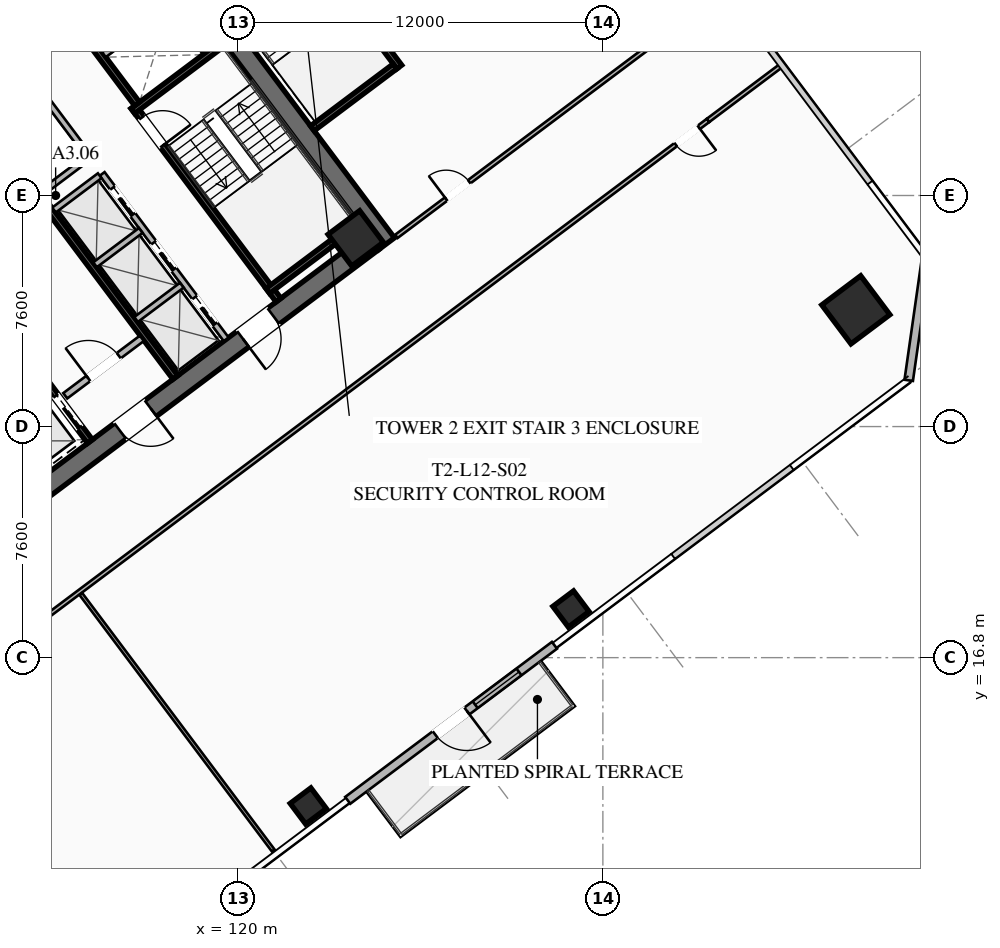
"""IFC4 building model, lengths in metres.
Left out: names, types, materials, properties, quantities, classifications, styles, units other than length and angle.
Written with IfcOpenShell. Run it as: python <this file> out.ifc"""

import sys

from ifc_helpers import new_model, si_unit, direction, frame, frame_2d, origin, origin_2d, place, context, subcontext, project, spatial, rectangle, hollow_rectangle, extrude, element, fill, save


model = new_model("IFC4")
c1 = context("Model", 3, precision=1e-05, world=origin(), true_north=direction((0.0, 1.0)))
c2 = subcontext(c1, "Body", "Model", "MODEL_VIEW")
j1 = project(units=[si_unit("LENGTHUNIT", "METRE"), si_unit("PLANEANGLEUNIT", "RADIAN")], contexts=[c1])
p1 = place(None, origin())
s1 = spatial("IfcSite", under=j1, at=p1, CompositionType="ELEMENT")
p2 = place(p1, origin())
s2 = spatial("IfcBuilding", under=s1, at=p2, CompositionType="ELEMENT")
p3 = place(p2, frame((0.0, 0.0, 49.45)))
s3 = spatial("IfcBuildingStorey", under=s2, at=p3, CompositionType="ELEMENT", Elevation=49.45)
p4 = place(p3, frame((115.524, 42.893, 0.0), z_axis=(0.0, 0.0, 1.0), x_axis=(0.600005007985, -0.799996243986, 0.0)))
e1 = element("IfcWall", 1, at=p4, inside=s3, PredefinedType="SHEAR", context=c2, shape_type="SweptSolid", body=[
    extrude(rectangle(XDim=15.6, YDim=0.65, at=frame_2d((7.8, 0.0))), origin(), (0.0, 0.0, 1.0), 3.55),
])
p5 = place(p3, frame((124.429, 30.478, 0.0), z_axis=(0.0, 0.0, 1.0), x_axis=(-0.799998028465, -0.600002628705, 0.0)))
e2 = element("IfcWall", 2, at=p5, inside=s3, PredefinedType="SHEAR", context=c2, shape_type="SweptSolid", body=[
    extrude(rectangle(XDim=14.86, YDim=0.65, at=frame_2d((7.43, 0.0))), origin(), (0.0, 0.0, 1.0), 3.55),
])
p6 = place(p5, frame((9.13, 0.0, 0.0)))
e3 = element("IfcOpeningElement", 3, at=p6, cuts=e2, PredefinedType="OPENING", context=c2, shape_type="SweptSolid", body=[
    extrude(rectangle(XDim=1.25, YDim=2.25, at=frame_2d((0.625, 1.125))), frame((0.0, 0.335, 0.0), z_axis=(0.0, -1.0, 0.0), x_axis=(1.0, 0.0, 0.0)), (0.0, 0.0, 1.0), 0.67),
])
p7 = place(p5, frame((4.08, 0.0, 0.0)))
e4 = element("IfcOpeningElement", 4, at=p7, cuts=e2, PredefinedType="OPENING", context=c2, shape_type="SweptSolid", body=[
    extrude(rectangle(XDim=1.25, YDim=2.25, at=frame_2d((0.625, 1.125))), frame((0.0, 0.335, 0.0), z_axis=(0.0, -1.0, 0.0), x_axis=(1.0, 0.0, 0.0)), (0.0, 0.0, 1.0), 0.67),
])
p8 = place(p3, frame((103.571, 33.522, 0.0), z_axis=(0.0, 0.0, 1.0), x_axis=(0.799998028465, 0.600002628705, 0.0)))
e5 = element("IfcWall", 5, at=p8, inside=s3, PredefinedType="SHEAR", context=c2, shape_type="SweptSolid", body=[
    extrude(rectangle(XDim=14.86, YDim=0.65, at=frame_2d((7.43, 0.0))), origin(), (0.0, 0.0, 1.0), 3.55),
])
p9 = place(p8, frame((4.48, 0.0, 0.0)))
e6 = element("IfcOpeningElement", 6, at=p9, cuts=e5, PredefinedType="OPENING", context=c2, shape_type="SweptSolid", body=[
    extrude(rectangle(XDim=1.25, YDim=2.25, at=frame_2d((0.625, 1.125))), frame((0.0, 0.335, 0.0), z_axis=(0.0, -1.0, 0.0), x_axis=(1.0, 0.0, 0.0)), (0.0, 0.0, 1.0), 0.67),
])
p10 = place(p8, frame((9.53, 0.0, 0.0)))
e7 = element("IfcOpeningElement", 7, at=p10, cuts=e5, PredefinedType="OPENING", context=c2, shape_type="SweptSolid", body=[
    extrude(rectangle(XDim=1.25, YDim=2.25, at=frame_2d((0.625, 1.125))), frame((0.0, 0.335, 0.0), z_axis=(0.0, -1.0, 0.0), x_axis=(1.0, 0.0, 0.0)), (0.0, 0.0, 1.0), 0.67),
])
p11 = place(p3, frame((123.87, 30.59, 0.0), z_axis=(0.0, 0.0, 1.0), x_axis=(0.799999996291, 0.600000004945, 0.0)))
e8 = element("IfcColumn", 8, at=p11, inside=s3, PredefinedType="COLUMN", context=c2, shape_type="SweptSolid", body=[
    extrude(hollow_rectangle(XDim=1.3, YDim=1.3, WallThickness=0.05, at=origin_2d()), origin(), (0.0, 0.0, 1.0), 3.35),
])
p12 = place(p3, frame((140.32, 28.24, 0.0), z_axis=(0.0, 0.0, 1.0), x_axis=(0.799999996291, 0.600000004945, 0.0)))
e9 = element("IfcColumn", 9, at=p12, inside=s3, PredefinedType="COLUMN", context=c2, shape_type="SweptSolid", body=[
    extrude(hollow_rectangle(XDim=1.6, YDim=1.6, WallThickness=0.06, at=origin_2d()), origin(), (0.0, 0.0, 1.0), 3.35),
])
for number, where, z_axis, x_axis in (
    (10, (122.31, 11.92, 0.0), (0.0, 0.0, 1.0), (0.8, 0.6, 0.0)),
    (11, (130.95, 18.4, 0.0), (0.0, 0.0, 1.0), (0.8, 0.6, 0.0)),
):
    element("IfcColumn", number, at=place(p3, frame(where, z_axis=z_axis, x_axis=x_axis)), inside=s3, PredefinedType="COLUMN", context=c2, shape_type="SweptSolid", body=[
        extrude(hollow_rectangle(XDim=0.85, YDim=0.85, WallThickness=0.035, at=origin_2d()), origin(), (0.0, 0.0, 1.0), 3.35),
    ])
p13 = place(p3, frame((130.408, 17.206, 0.0), z_axis=(0.0, 0.0, 1.0), x_axis=(-0.799996553335, -0.600004595526, 0.0)))
e12 = element("IfcWall", 12, at=p13, inside=s3, PredefinedType="SOLIDWALL", context=c2, shape_type="SweptSolid", body=[
    extrude(rectangle(XDim=8.5, YDim=0.28, at=frame_2d((4.25, 0.0))), origin(), (0.0, 0.0, 1.0), 3.35),
])
p14 = place(p13, frame((3.6, 0.0, 0.0)))
e13 = element("IfcOpeningElement", 13, at=p14, cuts=e12, PredefinedType="OPENING", context=c2, shape_type="SweptSolid", body=[
    extrude(rectangle(XDim=1.3, YDim=2.15, at=frame_2d((0.65, 1.075))), frame((0.0, 0.15, 0.0), z_axis=(0.0, -1.0, 0.0), x_axis=(1.0, 0.0, 0.0)), (0.0, 0.0, 1.0), 0.3),
])
p15 = place(p13, frame((1.46, 0.0, 0.85)))
e14 = element("IfcOpeningElement", 14, at=p15, cuts=e12, PredefinedType="OPENING", context=c2, shape_type="SweptSolid", body=[
    extrude(rectangle(XDim=1.8, YDim=1.92, at=frame_2d((0.9, 0.96))), frame((0.0, 0.15, 0.0), z_axis=(0.0, -1.0, 0.0), x_axis=(1.0, 0.0, 0.0)), (0.0, 0.0, 1.0), 0.3),
])
p16 = place(p3, frame((142.64, 29.98, 0.0), z_axis=(0.0, 0.0, 1.0), x_axis=(-0.14137968631, -0.989955445613, 0.0)))
e15 = element("IfcWall", 15, at=p16, inside=s3, PredefinedType="SOLIDWALL", context=c2, shape_type="SweptSolid", body=[
    extrude(rectangle(XDim=4.101, YDim=0.28, at=frame_2d((2.051, 0.0))), origin(), (0.0, 0.0, 1.0), 3.35),
])
p17 = place(p3, frame((116.56, 34.92, 0.0), z_axis=(0.0, 0.0, 1.0), x_axis=(0.600009827119, -0.799992629566, 0.0)))
e16 = element("IfcWall", 16, at=p17, inside=s3, PredefinedType="SHEAR", context=c2, shape_type="SweptSolid", body=[
    extrude(rectangle(XDim=7.95, YDim=0.2, at=frame_2d((3.975, 0.0))), origin(), (0.0, 0.0, 1.0), 3.35),
])
p18 = place(p17, frame((0.45, 0.0, 0.0)))
e17 = element("IfcOpeningElement", 17, at=p18, cuts=e16, PredefinedType="OPENING", context=c2, shape_type="SweptSolid", body=[
    extrude(rectangle(XDim=1.15, YDim=2.2, at=frame_2d((0.575, 1.1))), frame((0.0, 0.11, 0.0), z_axis=(0.0, -1.0, 0.0), x_axis=(1.0, 0.0, 0.0)), (0.0, 0.0, 1.0), 0.22),
])
for number, where, z_axis, x_axis in (
    (18, (116.54, 34.78, 0.0), (0.0, 0.0, 1.0), (0.8, 0.6, 0.0)),
    (19, (120.98, 28.86, 0.0), (0.0, 0.0, 1.0), (0.8, 0.6, 0.0)),
):
    element("IfcWall", number, at=place(p3, frame(where, z_axis=z_axis, x_axis=x_axis)), inside=s3, PredefinedType="SHEAR", context=c2, shape_type="SweptSolid", body=[
        extrude(rectangle(XDim=3.73, YDim=0.2, at=frame_2d((1.865, 0.0))), origin(), (0.0, 0.0, 1.0), 3.35),
    ])
p19 = place(p3, frame((117.938, 26.016, 0.0), z_axis=(0.0, 0.0, 1.0), x_axis=(-0.600005463273, 0.799995902516, 0.0)))
e20 = element("IfcWall", 20, at=p19, inside=s3, PredefinedType="SHEAR", context=c2, shape_type="SweptSolid", body=[
    extrude(rectangle(XDim=14.3, YDim=0.2, at=frame_2d((7.15, 0.0))), origin(), (0.0, 0.0, 1.0), 3.35),
])
p20 = place(p3, frame((114.316, 25.412, 0.0), z_axis=(0.0, 0.0, 1.0), x_axis=(0.800018601094, 0.59997519774, 0.0)))
e21 = element("IfcWall", 21, at=p20, inside=s3, PredefinedType="SOLIDWALL", context=c2, shape_type="SweptSolid", body=[
    extrude(rectangle(XDim=3.15, YDim=0.22, at=frame_2d((1.575, 0.0))), origin(), (0.0, 0.0, 1.0), 2.703),
])
p21 = place(p20, frame((0.95, 0.0, 0.0)))
e22 = element("IfcOpeningElement", 22, at=p21, cuts=e21, PredefinedType="OPENING", context=c2, shape_type="SweptSolid", body=[
    extrude(rectangle(XDim=1.25, YDim=2.25, at=frame_2d((0.625, 1.125))), frame((0.0, 0.12, 0.0), z_axis=(0.0, -1.0, 0.0), x_axis=(1.0, 0.0, 0.0)), (0.0, 0.0, 1.0), 0.24),
])
p22 = place(p3, frame((115.13, 23.91, 0.0), z_axis=(0.0, 0.0, 1.0), x_axis=(-0.599975393228, 0.800018454488, 0.0)))
e23 = element("IfcWall", 23, at=p22, inside=s3, PredefinedType="SHEAR", context=c2, shape_type="SweptSolid", body=[
    extrude(rectangle(XDim=6.35, YDim=0.2, at=frame_2d((3.175, 0.0))), origin(), (0.0, 0.0, 1.0), 3.35),
])
p23 = place(p22, frame((4.775, 0.0, 0.0)))
e24 = element("IfcOpeningElement", 24, at=p23, cuts=e23, PredefinedType="OPENING", context=c2, shape_type="SweptSolid", body=[
    extrude(rectangle(XDim=1.3, YDim=2.25, at=frame_2d((0.65, 1.125))), frame((0.0, 0.11, 0.0), z_axis=(0.0, -1.0, 0.0), x_axis=(1.0, 0.0, 0.0)), (0.0, 0.0, 1.0), 0.22),
])
p24 = place(p22, frame((2.775, 0.0, 0.0)))
e25 = element("IfcOpeningElement", 25, at=p24, cuts=e23, PredefinedType="OPENING", context=c2, shape_type="SweptSolid", body=[
    extrude(rectangle(XDim=1.3, YDim=2.25, at=frame_2d((0.65, 1.125))), frame((0.0, 0.11, 0.0), z_axis=(0.0, -1.0, 0.0), x_axis=(1.0, 0.0, 0.0)), (0.0, 0.0, 1.0), 0.22),
])
p25 = place(p22, frame((0.575, 0.0, 0.0)))
e26 = element("IfcOpeningElement", 26, at=p25, cuts=e23, PredefinedType="OPENING", context=c2, shape_type="SweptSolid", body=[
    extrude(rectangle(XDim=1.3, YDim=2.25, at=frame_2d((0.65, 1.125))), frame((0.0, 0.11, 0.0), z_axis=(0.0, -1.0, 0.0), x_axis=(1.0, 0.0, 0.0)), (0.0, 0.0, 1.0), 0.22),
])
p26 = place(p3, frame((112.87, 40.09, 0.0), z_axis=(0.0, 0.0, 1.0), x_axis=(0.599975393228, -0.800018454488, 0.0)))
e27 = element("IfcWall", 27, at=p26, inside=s3, PredefinedType="SHEAR", context=c2, shape_type="SweptSolid", body=[
    extrude(rectangle(XDim=6.35, YDim=0.2, at=frame_2d((3.175, 0.0))), origin(), (0.0, 0.0, 1.0), 3.35),
])
p27 = place(p3, frame((115.59, 36.63, 0.0), z_axis=(0.0, 0.0, 1.0), x_axis=(0.799973995579, 0.600034670996, 0.0)))
e28 = element("IfcWall", 28, at=p27, inside=s3, PredefinedType="SOLIDWALL", context=c2, shape_type="SweptSolid", body=[
    extrude(rectangle(XDim=3.38, YDim=0.2, at=frame_2d((1.69, 0.0))), origin(), (0.0, 0.0, 1.0), 3.35),
])
p28 = place(p3, frame((119.61, 27.27, 0.0), z_axis=(0.0, 0.0, 1.0), x_axis=(-0.600011488909, 0.79999138319, 0.0)))
e29 = element("IfcWall", 29, at=p28, inside=s3, PredefinedType="SOLIDWALL", context=c2, shape_type="SweptSolid", body=[
    extrude(rectangle(XDim=6.8, YDim=0.2, at=frame_2d((3.4, 0.0))), origin(), (0.0, 0.0, 1.0), 3.35),
])
p29 = place(p28, frame((0.625, 0.0, 0.0)))
e30 = element("IfcOpeningElement", 30, at=p29, cuts=e29, PredefinedType="OPENING", context=c2, shape_type="SweptSolid", body=[
    extrude(rectangle(XDim=1.1, YDim=2.2, at=frame_2d((0.55, 1.1))), frame((0.0, 0.11, 0.0), z_axis=(0.0, -1.0, 0.0), x_axis=(1.0, 0.0, 0.0)), (0.0, 0.0, 1.0), 0.22),
])
p30 = place(p28, frame((2.875, 0.0, 0.0)))
e31 = element("IfcOpeningElement", 31, at=p30, cuts=e29, PredefinedType="OPENING", context=c2, shape_type="SweptSolid", body=[
    extrude(rectangle(XDim=1.1, YDim=2.2, at=frame_2d((0.55, 1.1))), frame((0.0, 0.11, 0.0), z_axis=(0.0, -1.0, 0.0), x_axis=(1.0, 0.0, 0.0)), (0.0, 0.0, 1.0), 0.22),
])
p31 = place(p28, frame((5.125, 0.0, 0.0)))
e32 = element("IfcOpeningElement", 32, at=p31, cuts=e29, PredefinedType="OPENING", context=c2, shape_type="SweptSolid", body=[
    extrude(rectangle(XDim=1.1, YDim=2.2, at=frame_2d((0.55, 1.1))), frame((0.0, 0.11, 0.0), z_axis=(0.0, -1.0, 0.0), x_axis=(1.0, 0.0, 0.0)), (0.0, 0.0, 1.0), 0.22),
])
p32 = place(p3, frame((116.646, 27.922, 0.0), z_axis=(0.0, 0.0, 1.0), x_axis=(0.8, 0.6, 0.0)))
e33 = element("IfcWall", 33, at=p32, inside=s3, PredefinedType="SOLIDWALL", context=c2, shape_type="SweptSolid", body=[
    extrude(rectangle(XDim=1.88, YDim=0.2, at=frame_2d((0.94, 0.0))), origin(), (0.0, 0.0, 1.0), 3.35),
])
p33 = place(p3, frame((115.296, 29.722, 0.0), z_axis=(0.0, 0.0, 1.0), x_axis=(0.799984418148, 0.600020775241, 0.0)))
e34 = element("IfcWall", 34, at=p33, inside=s3, PredefinedType="SOLIDWALL", context=c2, shape_type="SweptSolid", body=[
    extrude(rectangle(XDim=1.88, YDim=0.2, at=frame_2d((0.94, 0.0))), origin(), (0.0, 0.0, 1.0), 3.35),
])
p34 = place(p3, frame((113.946, 31.522, 0.0), z_axis=(0.0, 0.0, 1.0), x_axis=(0.8, 0.6, 0.0)))
e35 = element("IfcWall", 35, at=p34, inside=s3, PredefinedType="SOLIDWALL", context=c2, shape_type="SweptSolid", body=[
    extrude(rectangle(XDim=1.88, YDim=0.2, at=frame_2d((0.94, 0.0))), origin(), (0.0, 0.0, 1.0), 3.35),
])
p35 = place(p3, frame((115.11, 33.27, 0.0), z_axis=(0.0, 0.0, 1.0), x_axis=(-0.600011488909, 0.79999138319, 0.0)))
e36 = element("IfcWall", 36, at=p35, inside=s3, PredefinedType="SOLIDWALL", context=c2, shape_type="SweptSolid", body=[
    extrude(rectangle(XDim=6.8, YDim=0.2, at=frame_2d((3.4, 0.0))), origin(), (0.0, 0.0, 1.0), 3.35),
])
p36 = place(p3, frame((113.526, 32.082, 0.0), z_axis=(0.0, 0.0, 1.0), x_axis=(0.800046745961, 0.599937666993, 0.0)))
e37 = element("IfcWall", 37, at=p36, inside=s3, PredefinedType="SOLIDWALL", context=c2, shape_type="SweptSolid", body=[
    extrude(rectangle(XDim=1.88, YDim=0.2, at=frame_2d((0.94, 0.0))), origin(), (0.0, 0.0, 1.0), 3.35),
])
p37 = place(p3, frame((125.304, 36.228, 0.0), z_axis=(0.0, 0.0, 1.0), x_axis=(-0.59998851072, 0.800008616831, 0.0)))
e38 = element("IfcWall", 38, at=p37, inside=s3, PredefinedType="SHEAR", context=c2, shape_type="SweptSolid", body=[
    extrude(rectangle(XDim=6.8, YDim=0.2, at=frame_2d((3.4, 0.0))), origin(), (0.0, 0.0, 1.0), 3.35),
])
p38 = place(p3, frame((122.444, 34.208, 0.0), z_axis=(0.0, 0.0, 1.0), x_axis=(0.79999138319, 0.600011488909, 0.0)))
e39 = element("IfcWall", 39, at=p38, inside=s3, PredefinedType="SHEAR", context=c2, shape_type="SweptSolid", body=[
    extrude(rectangle(XDim=3.4, YDim=0.2, at=frame_2d((1.7, 0.0))), origin(), (0.0, 0.0, 1.0), 3.35),
])
p39 = place(p3, frame((98.516, 34.012, 0.0), z_axis=(0.0, 0.0, 1.0), x_axis=(0.799998035726, 0.600002619023, 0.0)))
e40 = element("IfcWall", 40, at=p39, inside=s3, PredefinedType="PARTITIONING", context=c2, shape_type="SweptSolid", body=[
    extrude(rectangle(XDim=29.83, YDim=0.135, at=frame_2d((14.915, 0.0))), origin(), (0.0, 0.0, 1.0), 2.703),
])
p40 = place(p39, frame((0.3, 0.0, 0.0)))
e41 = element("IfcOpeningElement", 41, at=p40, cuts=e40, PredefinedType="OPENING", context=c2, shape_type="SweptSolid", body=[
    extrude(rectangle(XDim=0.95, YDim=2.05, at=frame_2d((0.475, 1.025))), frame((0.0, 0.077, 0.0), z_axis=(0.0, -1.0, 0.0), x_axis=(1.0, 0.0, 0.0)), (0.0, 0.0, 1.0), 0.155),
])
p41 = place(p39, frame((28.58, 0.0, 0.0)))
e42 = element("IfcOpeningElement", 42, at=p41, cuts=e40, PredefinedType="OPENING", context=c2, shape_type="SweptSolid", body=[
    extrude(rectangle(XDim=0.95, YDim=2.05, at=frame_2d((0.475, 1.025))), frame((0.0, 0.077, 0.0), z_axis=(0.0, -1.0, 0.0), x_axis=(1.0, 0.0, 0.0)), (0.0, 0.0, 1.0), 0.155),
])
p42 = place(p3, frame((135.46, 34.47, 0.0), z_axis=(0.0, 0.0, 1.0), x_axis=(-0.800000982127, -0.599998690494, 0.0)))
e43 = element("IfcWall", 43, at=p42, inside=s3, PredefinedType="PARTITIONING", context=c2, shape_type="SweptSolid", body=[
    extrude(rectangle(XDim=29.83, YDim=0.135, at=frame_2d((14.915, 0.0))), origin(), (0.0, 0.0, 1.0), 2.703),
])
p43 = place(p42, frame((28.5, 0.0, 0.0)))
e44 = element("IfcOpeningElement", 44, at=p43, cuts=e43, PredefinedType="OPENING", context=c2, shape_type="SweptSolid", body=[
    extrude(rectangle(XDim=0.95, YDim=2.05, at=frame_2d((0.475, 1.025))), frame((0.0, 0.077, 0.0), z_axis=(0.0, -1.0, 0.0), x_axis=(1.0, 0.0, 0.0)), (0.0, 0.0, 1.0), 0.155),
])
p44 = place(p42, frame((0.38, 0.0, 0.0)))
e45 = element("IfcOpeningElement", 45, at=p44, cuts=e43, PredefinedType="OPENING", context=c2, shape_type="SweptSolid", body=[
    extrude(rectangle(XDim=0.95, YDim=2.05, at=frame_2d((0.475, 1.025))), frame((0.0, 0.077, 0.0), z_axis=(0.0, -1.0, 0.0), x_axis=(1.0, 0.0, 0.0)), (0.0, 0.0, 1.0), 0.155),
])
p45 = place(p3, frame((135.46, 34.47, 0.0), z_axis=(0.0, 0.0, 1.0), x_axis=(0.799990331366, 0.600012891296, 0.0)))
e46 = element("IfcWall", 46, at=p45, inside=s3, PredefinedType="PARTITIONING", context=c2, shape_type="SweptSolid", body=[
    extrude(rectangle(XDim=3.03, YDim=0.135, at=frame_2d((1.515, 0.0))), origin(), (0.0, 0.0, 1.0), 2.703),
])
p46 = place(p3, frame((121.158, 10.456, 0.0), z_axis=(0.0, 0.0, 1.0), x_axis=(-0.600007405188, 0.799994446056, 0.0)))
e47 = element("IfcWall", 47, at=p46, inside=s3, PredefinedType="PARTITIONING", context=c2, shape_type="SweptSolid", body=[
    extrude(rectangle(XDim=10.55, YDim=0.11, at=frame_2d((5.275, 0.0))), origin(), (0.0, 0.0, 1.0), 2.703),
])
p47 = place(p3, frame((125.208, 30.656, 0.0), z_axis=(0.0, 0.0, 1.0), x_axis=(0.799995666112, 0.600005778473, 0.0)))
e48 = element("IfcWall", 48, at=p47, inside=s3, PredefinedType="PARTITIONING", context=c2, shape_type="SweptSolid", body=[
    extrude(rectangle(XDim=13.52, YDim=0.135, at=frame_2d((6.76, 0.0))), origin(), (0.0, 0.0, 1.0), 2.703),
])
p48 = place(p47, frame((2.045, 0.0, 0.0)))
e49 = element("IfcOpeningElement", 49, at=p48, cuts=e48, PredefinedType="OPENING", context=c2, shape_type="SweptSolid", body=[
    extrude(rectangle(XDim=0.95, YDim=2.05, at=frame_2d((0.475, 1.025))), frame((0.0, 0.077, 0.0), z_axis=(0.0, -1.0, 0.0), x_axis=(1.0, 0.0, 0.0)), (0.0, 0.0, 1.0), 0.155),
])
p49 = place(p14, origin())
e50 = element("IfcDoor", 50, at=p49, inside=s3, OperationType="SINGLE_SWING_LEFT", PredefinedType="DOOR", context=c2, shape_type="SweptSolid", body=[
    extrude(rectangle(XDim=1.3, YDim=2.15, at=frame_2d((0.65, 1.075))), frame((0.0, 0.025, 0.0), z_axis=(0.0, -1.0, 0.0), x_axis=(1.0, 0.0, 0.0)), (0.0, 0.0, 1.0), 0.05),
])
fill(e13, e50)
p50 = place(p15, origin())
e51 = element("IfcWindow", 51, at=p50, inside=s3, PartitioningType="SINGLE_PANEL", PredefinedType="WINDOW", context=c2, shape_type="SweptSolid", body=[
    extrude(rectangle(XDim=1.8, YDim=1.92, at=frame_2d((0.9, 0.96))), frame((0.0, 0.03, 0.0), z_axis=(0.0, -1.0, 0.0), x_axis=(1.0, 0.0, 0.0)), (0.0, 0.0, 1.0), 0.06),
])
fill(e14, e51)
p51 = place(p6, origin())
e52 = element("IfcDoor", 52, at=p51, inside=s3, OperationType="SINGLE_SWING_LEFT", PredefinedType="DOOR", context=c2, shape_type="SweptSolid", body=[
    extrude(rectangle(XDim=1.25, YDim=2.25, at=frame_2d((0.625, 1.125))), frame((0.0, 0.025, 0.0), z_axis=(0.0, -1.0, 0.0), x_axis=(1.0, 0.0, 0.0)), (0.0, 0.0, 1.0), 0.05),
])
fill(e3, e52)
p52 = place(p7, origin())
e53 = element("IfcDoor", 53, at=p52, inside=s3, OperationType="SINGLE_SWING_RIGHT", PredefinedType="DOOR", context=c2, shape_type="SweptSolid", body=[
    extrude(rectangle(XDim=1.25, YDim=2.25, at=frame_2d((0.625, 1.125))), frame((0.0, 0.025, 0.0), z_axis=(0.0, -1.0, 0.0), x_axis=(1.0, 0.0, 0.0)), (0.0, 0.0, 1.0), 0.05),
])
fill(e4, e53)
p53 = place(p18, origin())
e54 = element("IfcDoor", 54, at=p53, inside=s3, OperationType="SINGLE_SWING_RIGHT", PredefinedType="DOOR", context=c2, shape_type="SweptSolid", body=[
    extrude(rectangle(XDim=1.15, YDim=2.2, at=frame_2d((0.575, 1.1))), frame((0.0, 0.025, 0.0), z_axis=(0.0, -1.0, 0.0), x_axis=(1.0, 0.0, 0.0)), (0.0, 0.0, 1.0), 0.05),
])
fill(e17, e54)
p54 = place(p21, origin())
e55 = element("IfcDoor", 55, at=p54, inside=s3, OperationType="SINGLE_SWING_LEFT", PredefinedType="DOOR", context=c2, shape_type="SweptSolid", body=[
    extrude(rectangle(XDim=1.25, YDim=2.25, at=frame_2d((0.625, 1.125))), frame((0.0, 0.025, 0.0), z_axis=(0.0, -1.0, 0.0), x_axis=(1.0, 0.0, 0.0)), (0.0, 0.0, 1.0), 0.05),
])
fill(e22, e55)
p55 = place(p44, origin())
e56 = element("IfcDoor", 56, at=p55, inside=s3, OperationType="SINGLE_SWING_LEFT", PredefinedType="DOOR", context=c2, shape_type="SweptSolid", body=[
    extrude(rectangle(XDim=0.95, YDim=2.05, at=frame_2d((0.475, 1.025))), frame((0.0, 0.025, 0.0), z_axis=(0.0, -1.0, 0.0), x_axis=(1.0, 0.0, 0.0)), (0.0, 0.0, 1.0), 0.05),
])
fill(e45, e56)
p56 = place(p48, origin())
e57 = element("IfcDoor", 57, at=p56, inside=s3, OperationType="SINGLE_SWING_LEFT", PredefinedType="DOOR", context=c2, shape_type="SweptSolid", body=[
    extrude(rectangle(XDim=0.95, YDim=2.05, at=frame_2d((0.475, 1.025))), frame((0.0, 0.025, 0.0), z_axis=(0.0, -1.0, 0.0), x_axis=(1.0, 0.0, 0.0)), (0.0, 0.0, 1.0), 0.05),
])
fill(e49, e57)
p57 = place(p25, origin())
e58 = element("IfcDoor", 58, at=p57, inside=s3, OperationType="SLIDING_TO_LEFT", PredefinedType="DOOR", context=c2, shape_type="SweptSolid", body=[
    extrude(rectangle(XDim=1.3, YDim=2.25, at=frame_2d((0.65, 1.125))), frame((0.0, 0.025, 0.0), z_axis=(0.0, -1.0, 0.0), x_axis=(1.0, 0.0, 0.0)), (0.0, 0.0, 1.0), 0.05),
])
fill(e26, e58)
p58 = place(p29, origin())
e59 = element("IfcDoor", 59, at=p58, inside=s3, OperationType="SLIDING_TO_LEFT", PredefinedType="DOOR", context=c2, shape_type="SweptSolid", body=[
    extrude(rectangle(XDim=1.1, YDim=2.2, at=frame_2d((0.55, 1.1))), frame((0.0, 0.025, 0.0), z_axis=(0.0, -1.0, 0.0), x_axis=(1.0, 0.0, 0.0)), (0.0, 0.0, 1.0), 0.05),
])
fill(e30, e59)
p59 = place(p30, origin())
e60 = element("IfcDoor", 60, at=p59, inside=s3, OperationType="SLIDING_TO_LEFT", PredefinedType="DOOR", context=c2, shape_type="SweptSolid", body=[
    extrude(rectangle(XDim=1.1, YDim=2.2, at=frame_2d((0.55, 1.1))), frame((0.0, 0.025, 0.0), z_axis=(0.0, -1.0, 0.0), x_axis=(1.0, 0.0, 0.0)), (0.0, 0.0, 1.0), 0.05),
])
fill(e31, e60)
p60 = place(p31, origin())
e61 = element("IfcDoor", 61, at=p60, inside=s3, OperationType="SLIDING_TO_LEFT", PredefinedType="DOOR", context=c2, shape_type="SweptSolid", body=[
    extrude(rectangle(XDim=1.1, YDim=2.2, at=frame_2d((0.55, 1.1))), frame((0.0, 0.025, 0.0), z_axis=(0.0, -1.0, 0.0), x_axis=(1.0, 0.0, 0.0)), (0.0, 0.0, 1.0), 0.05),
])
fill(e32, e61)
save(model, sys.argv[1])
